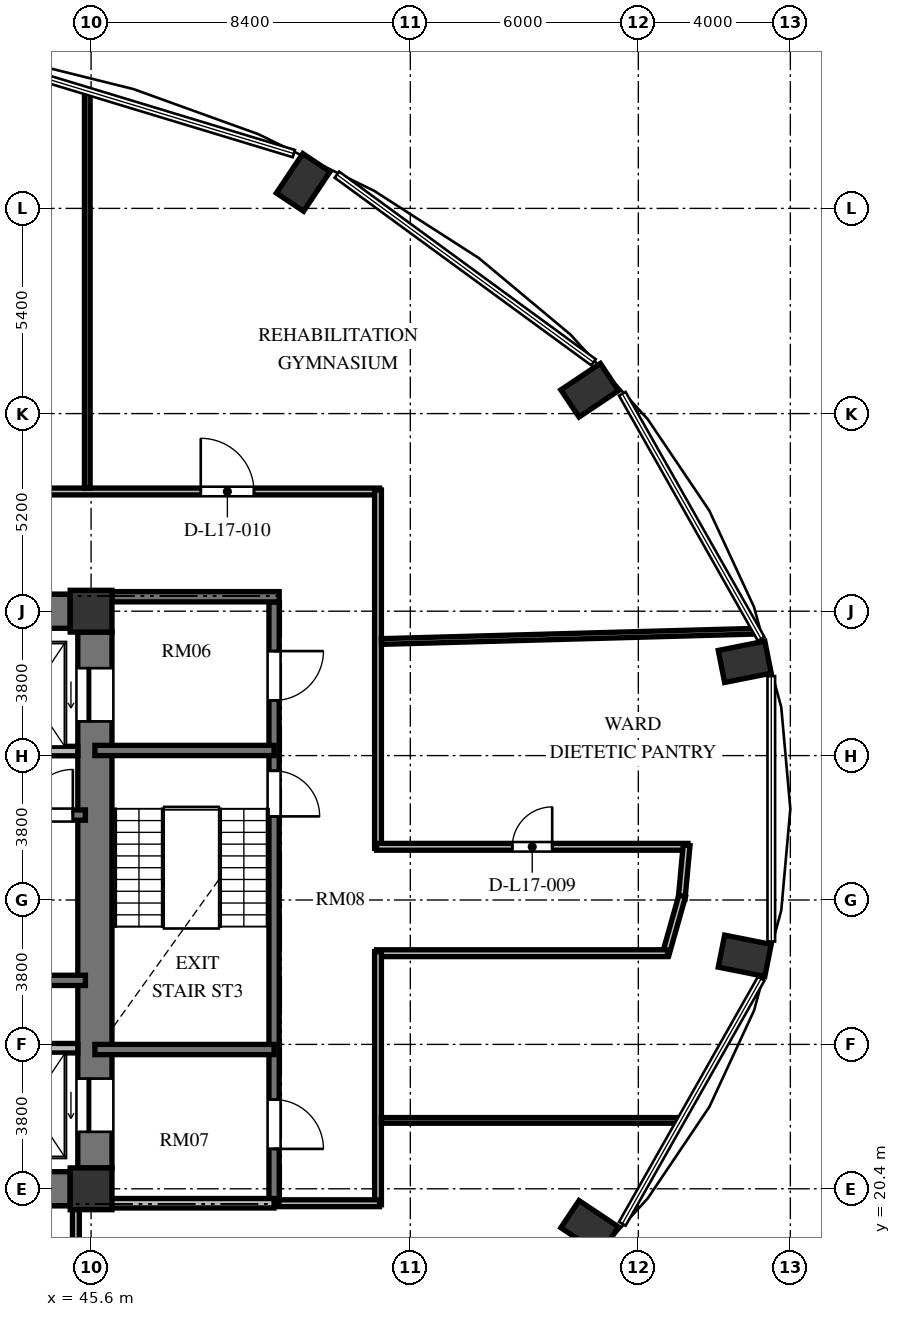
"""IFC4 building model, lengths in metres.
Left out: names, types, materials, properties, quantities, classifications, styles, units other than length and angle.
Written with IfcOpenShell. Run it as: python <this file> out.ifc"""

import sys

from ifc_helpers import new_model, si_unit, direction, frame, frame_2d, origin, origin_2d, place, context, subcontext, project, spatial, rectangle, extrude, element, fill, save


model = new_model("IFC4")
c1 = context("Model", 3, precision=1e-05, world=origin(), true_north=direction((0.0, 1.0)))
c2 = subcontext(c1, "Body", "Model", "MODEL_VIEW")
j1 = project(units=[si_unit("LENGTHUNIT", "METRE"), si_unit("PLANEANGLEUNIT", "RADIAN")], contexts=[c1])
p1 = place(None, origin())
s1 = spatial("IfcSite", under=j1, at=p1, CompositionType="ELEMENT")
p2 = place(p1, origin())
s2 = spatial("IfcBuilding", under=s1, at=p2, CompositionType="ELEMENT")
p3 = place(p2, frame((0.0, 0.0, 68.976)))
s3 = spatial("IfcBuildingStorey", under=s2, at=p3, CompositionType="ELEMENT", Elevation=68.976)
for number, where, z_axis, x_axis in (
    (1, (58.72, 19.386, 0.0), (0.0, 0.0, 1.0), (0.831, -0.556, 0.0)),
    (2, (62.8, 26.532, 0.0), (0.0, 0.0, 1.0), (0.981, -0.195, 0.0)),
    (3, (62.8, 34.268, 0.0), (0.0, 0.0, 1.0), (0.981, 0.195, 0.0)),
    (4, (58.72, 41.414, 0.0), (0.0, 0.0, 1.0), (0.831, 0.556, 0.0)),
    (5, (51.181, 46.884, 0.0), (0.0, 0.0, 1.0), (0.556, 0.831, 0.0)),
):
    element("IfcColumn", number, at=place(p3, frame(where, z_axis=z_axis, x_axis=x_axis)), inside=s3, PredefinedType="COLUMN", context=c2, shape_type="SweptSolid", body=[
        extrude(rectangle(XDim=1.25, YDim=0.86, at=origin_2d()), origin(), (0.0, 0.0, 1.0), 3.648),
    ])
for number, where, z_axis, x_axis in (
    (6, (45.6, 20.4, 0.0), (0.0, 0.0, 1.0), (1.0, 0.0, 0.0)),
    (7, (45.6, 35.6, 0.0), (0.0, 0.0, 1.0), (1.0, 0.0, 0.0)),
):
    element("IfcColumn", number, at=place(p3, frame(where, z_axis=z_axis, x_axis=x_axis)), inside=s3, PredefinedType="COLUMN", context=c2, shape_type="SweptSolid", body=[
        extrude(rectangle(XDim=1.1, YDim=1.1, at=origin_2d()), origin(), (0.0, 0.0, 1.0), 3.648),
    ])
p4 = place(p3, frame((45.7, 20.95, 0.0), z_axis=(0.0, 0.0, 1.0), x_axis=(0.0, 1.0, 0.0)))
e8 = element("IfcWall", 8, at=p4, inside=s3, PredefinedType="SHEAR", context=c2, shape_type="SweptSolid", body=[
    extrude(rectangle(XDim=14.1, YDim=0.9, at=frame_2d((7.05, 0.0))), origin(), (0.0, 0.0, 1.0), 3.648),
])
p5 = place(p4, frame((11.75, 0.0, 0.0)))
e9 = element("IfcOpeningElement", 9, at=p5, cuts=e8, PredefinedType="OPENING", context=c2, shape_type="SweptSolid", body=[
    extrude(rectangle(XDim=1.4, YDim=2.3, at=frame_2d((0.7, 1.15))), frame((0.0, 0.46, 0.0), z_axis=(0.0, -1.0, 0.0), x_axis=(1.0, 0.0, 0.0)), (0.0, 0.0, 1.0), 0.92),
])
p6 = place(p4, frame((0.95, 0.0, 0.0)))
e10 = element("IfcOpeningElement", 10, at=p6, cuts=e8, PredefinedType="OPENING", context=c2, shape_type="SweptSolid", body=[
    extrude(rectangle(XDim=1.4, YDim=2.3, at=frame_2d((0.7, 1.15))), frame((0.0, 0.46, 0.0), z_axis=(0.0, -1.0, 0.0), x_axis=(1.0, 0.0, 0.0)), (0.0, 0.0, 1.0), 0.92),
])
for number, where, z_axis, x_axis in (
    (11, (39.75, 20.4, 0.0), (0.0, 0.0, 1.0), (1.0, 0.0, 0.0)),
    (12, (39.75, 35.6, 0.0), (0.0, 0.0, 1.0), (1.0, 0.0, 0.0)),
):
    element("IfcWall", number, at=place(p3, frame(where, z_axis=z_axis, x_axis=x_axis)), inside=s3, PredefinedType="SHEAR", context=c2, shape_type="SweptSolid", body=[
        extrude(rectangle(XDim=5.3, YDim=0.9, at=frame_2d((2.65, 0.0))), origin(), (0.0, 0.0, 1.0), 3.648),
    ])
p7 = place(p3, frame((37.465, 30.235, 0.0), z_axis=(0.0, 0.0, 1.0), x_axis=(1.0, 0.0, 0.0)))
e13 = element("IfcWall", 13, at=p7, inside=s3, PredefinedType="SHEAR", context=c2, shape_type="SweptSolid", body=[
    extrude(rectangle(XDim=7.985, YDim=0.27, at=frame_2d((3.992, 0.0))), origin(), (0.0, 0.0, 1.0), 3.648),
])
p8 = place(p7, frame((6.455, 0.0, 0.0)))
e14 = element("IfcOpeningElement", 14, at=p8, cuts=e13, PredefinedType="OPENING", context=c2, shape_type="SweptSolid", body=[
    extrude(rectangle(XDim=1.2, YDim=2.15, at=frame_2d((0.6, 1.075))), frame((0.0, 0.145, 0.0), z_axis=(0.0, -1.0, 0.0), x_axis=(1.0, 0.0, 0.0)), (0.0, 0.0, 1.0), 0.29),
])
p9 = place(p3, frame((37.465, 25.885, 0.0), z_axis=(0.0, 0.0, 1.0), x_axis=(1.0, 0.0, 0.0)))
e15 = element("IfcWall", 15, at=p9, inside=s3, PredefinedType="SHEAR", context=c2, shape_type="SweptSolid", body=[
    extrude(rectangle(XDim=7.985, YDim=0.27, at=frame_2d((3.992, 0.0))), origin(), (0.0, 0.0, 1.0), 3.648),
])
for number, where, z_axis, x_axis in (
    (16, (42.95, 31.92, 0.0), (0.0, 0.0, 1.0), (1.0, 0.0, 0.0)),
    (17, (42.95, 24.1, 0.0), (0.0, 0.0, 1.0), (1.0, 0.0, 0.0)),
):
    element("IfcWall", number, at=place(p3, frame(where, z_axis=z_axis, x_axis=x_axis)), inside=s3, PredefinedType="SOLIDWALL", context=c2, shape_type="SweptSolid", body=[
        extrude(rectangle(XDim=2.3, YDim=0.25, at=frame_2d((1.15, 0.0))), origin(), (0.0, 0.0, 1.0), 3.428),
    ])
p10 = place(p3, frame((50.415, 35.845, 0.0), z_axis=(0.0, 0.0, 1.0), x_axis=(0.0, -1.0, 0.0)))
e18 = element("IfcWall", 18, at=p10, inside=s3, PredefinedType="SHEAR", context=c2, shape_type="SweptSolid", body=[
    extrude(rectangle(XDim=15.825, YDim=0.27, at=frame_2d((7.913, 0.0))), origin(), (0.0, 0.0, 1.0), 3.648),
])
p11 = place(p10, frame((4.445, 0.0, 0.0)))
e19 = element("IfcOpeningElement", 19, at=p11, cuts=e18, PredefinedType="OPENING", context=c2, shape_type="SweptSolid", body=[
    extrude(rectangle(XDim=1.2, YDim=2.15, at=frame_2d((0.6, 1.075))), frame((0.0, 0.145, 0.0), z_axis=(0.0, -1.0, 0.0), x_axis=(1.0, 0.0, 0.0)), (0.0, 0.0, 1.0), 0.29),
])
p12 = place(p10, frame((1.295, 0.0, 0.0)))
e20 = element("IfcOpeningElement", 20, at=p12, cuts=e18, PredefinedType="OPENING", context=c2, shape_type="SweptSolid", body=[
    extrude(rectangle(XDim=1.3, YDim=2.2, at=frame_2d((0.65, 1.1))), frame((0.0, 0.145, 0.0), z_axis=(0.0, -1.0, 0.0), x_axis=(1.0, 0.0, 0.0)), (0.0, 0.0, 1.0), 0.29),
])
p13 = place(p10, frame((13.095, 0.0, 0.0)))
e21 = element("IfcOpeningElement", 21, at=p13, cuts=e18, PredefinedType="OPENING", context=c2, shape_type="SweptSolid", body=[
    extrude(rectangle(XDim=1.3, YDim=2.2, at=frame_2d((0.65, 1.1))), frame((0.0, 0.145, 0.0), z_axis=(0.0, -1.0, 0.0), x_axis=(1.0, 0.0, 0.0)), (0.0, 0.0, 1.0), 0.29),
])
p14 = place(p3, frame((46.15, 35.98, 0.0), z_axis=(0.0, 0.0, 1.0), x_axis=(1.0, 0.0, 0.0)))
e22 = element("IfcWall", 22, at=p14, inside=s3, PredefinedType="SHEAR", context=c2, shape_type="SweptSolid", body=[
    extrude(rectangle(XDim=4.4, YDim=0.27, at=frame_2d((2.2, 0.0))), origin(), (0.0, 0.0, 1.0), 3.648),
])
for number, where, z_axis, x_axis in (
    (23, (45.7, 31.935, 0.0), (0.0, 0.0, 1.0), (1.0, 0.0, 0.0)),
    (24, (45.7, 24.065, 0.0), (0.0, 0.0, 1.0), (1.0, 0.0, 0.0)),
):
    element("IfcWall", number, at=place(p3, frame(where, z_axis=z_axis, x_axis=x_axis)), inside=s3, PredefinedType="SHEAR", context=c2, shape_type="SweptSolid", body=[
        extrude(rectangle(XDim=4.715, YDim=0.27, at=frame_2d((2.357, 0.0))), origin(), (0.0, 0.0, 1.0), 3.648),
    ])
p15 = place(p3, frame((45.7, 20.02, 0.0), z_axis=(0.0, 0.0, 1.0), x_axis=(1.0, 0.0, 0.0)))
e25 = element("IfcWall", 25, at=p15, inside=s3, PredefinedType="SOLIDWALL", context=c2, shape_type="SweptSolid", body=[
    extrude(rectangle(XDim=4.715, YDim=0.25, at=frame_2d((2.357, 0.0))), origin(), (0.0, 0.0, 1.0), 2.813),
])
p16 = place(p3, frame((23.31, 38.75, 0.0), z_axis=(0.0, 0.0, 1.0), x_axis=(1.0, 0.0, 0.0)))
e26 = element("IfcWall", 26, at=p16, inside=s3, PredefinedType="PARTITIONING", context=c2, shape_type="SweptSolid", body=[
    extrude(rectangle(XDim=29.88, YDim=0.18, at=frame_2d((14.94, 0.0))), origin(), (0.0, 0.0, 1.0), 3.053),
])
p17 = place(p16, frame((25.176, 0.0, 0.0)))
e27 = element("IfcOpeningElement", 27, at=p17, cuts=e26, PredefinedType="OPENING", context=c2, shape_type="SweptSolid", body=[
    extrude(rectangle(XDim=1.4, YDim=2.2, at=frame_2d((0.7, 1.1))), frame((0.0, 0.1, 0.0), z_axis=(0.0, -1.0, 0.0), x_axis=(1.0, 0.0, 0.0)), (0.0, 0.0, 1.0), 0.2),
])
p18 = place(p16, frame((17.74, 0.0, 0.0)))
e28 = element("IfcOpeningElement", 28, at=p18, cuts=e26, PredefinedType="OPENING", context=c2, shape_type="SweptSolid", body=[
    extrude(rectangle(XDim=1.4, YDim=2.2, at=frame_2d((0.7, 1.1))), frame((0.0, 0.1, 0.0), z_axis=(0.0, -1.0, 0.0), x_axis=(1.0, 0.0, 0.0)), (0.0, 0.0, 1.0), 0.2),
])
p19 = place(p16, frame((11.236, 0.0, 0.0)))
e29 = element("IfcOpeningElement", 29, at=p19, cuts=e26, PredefinedType="OPENING", context=c2, shape_type="SweptSolid", body=[
    extrude(rectangle(XDim=1.4, YDim=2.2, at=frame_2d((0.7, 1.1))), frame((0.0, 0.1, 0.0), z_axis=(0.0, -1.0, 0.0), x_axis=(1.0, 0.0, 0.0)), (0.0, 0.0, 1.0), 0.2),
])
p20 = place(p3, frame((53.15, 38.79, 0.0), z_axis=(0.0, 0.0, 1.0), x_axis=(0.0, -1.0, 0.0)))
e30 = element("IfcWall", 30, at=p20, inside=s3, PredefinedType="PARTITIONING", context=c2, shape_type="SweptSolid", body=[
    extrude(rectangle(XDim=9.43, YDim=0.18, at=frame_2d((4.715, 0.0))), origin(), (0.0, 0.0, 1.0), 3.428),
])
p21 = place(p3, frame((53.11, 29.4, 0.0), z_axis=(0.0, 0.0, 1.0), x_axis=(1.0, 0.0, 0.0)))
e31 = element("IfcWall", 31, at=p21, inside=s3, PredefinedType="PARTITIONING", context=c2, shape_type="SweptSolid", body=[
    extrude(rectangle(XDim=8.197, YDim=0.18, at=frame_2d((4.098, 0.0))), origin(), (0.0, 0.0, 1.0), 3.428),
])
p22 = place(p21, frame((3.573, 0.0, 0.0)))
e32 = element("IfcOpeningElement", 32, at=p22, cuts=e31, PredefinedType="OPENING", context=c2, shape_type="SweptSolid", body=[
    extrude(rectangle(XDim=1.05, YDim=2.15, at=frame_2d((0.525, 1.075))), frame((0.0, 0.1, 0.0), z_axis=(0.0, -1.0, 0.0), x_axis=(1.0, 0.0, 0.0)), (0.0, 0.0, 1.0), 0.2),
])
p23 = place(p3, frame((61.271, 29.44, 0.0), z_axis=(0.0, 0.0, 1.0), x_axis=(-0.092539930621, -0.995708974169, 0.0)))
e33 = element("IfcWall", 33, at=p23, inside=s3, PredefinedType="PARTITIONING", context=c2, shape_type="SweptSolid", body=[
    extrude(rectangle(XDim=1.417, YDim=0.18, at=frame_2d((0.708, 0.0))), origin(), (0.0, 0.0, 1.0), 3.428),
])
p24 = place(p3, frame((61.154, 28.107, 0.0), z_axis=(0.0, 0.0, 1.0), x_axis=(-0.271748942561, -0.962368179138, 0.0)))
e34 = element("IfcWall", 34, at=p24, inside=s3, PredefinedType="PARTITIONING", context=c2, shape_type="SweptSolid", body=[
    extrude(rectangle(XDim=1.606, YDim=0.18, at=frame_2d((0.803, 0.0))), origin(), (0.0, 0.0, 1.0), 3.428),
])
p25 = place(p3, frame((60.768, 26.6, 0.0), z_axis=(0.0, 0.0, 1.0), x_axis=(-1.0, 0.0, 0.0)))
e35 = element("IfcWall", 35, at=p25, inside=s3, PredefinedType="PARTITIONING", context=c2, shape_type="SweptSolid", body=[
    extrude(rectangle(XDim=7.658, YDim=0.18, at=frame_2d((3.829, 0.0))), origin(), (0.0, 0.0, 1.0), 3.428),
])
p26 = place(p3, frame((53.15, 26.64, 0.0), z_axis=(0.0, 0.0, 1.0), x_axis=(0.0, -1.0, 0.0)))
e36 = element("IfcWall", 36, at=p26, inside=s3, PredefinedType="PARTITIONING", context=c2, shape_type="SweptSolid", body=[
    extrude(rectangle(XDim=6.66, YDim=0.18, at=frame_2d((3.33, 0.0))), origin(), (0.0, 0.0, 1.0), 3.428),
])
p27 = place(p3, frame((53.19, 20.02, 0.0), z_axis=(0.0, 0.0, 1.0), x_axis=(-1.0, 0.0, 0.0)))
e37 = element("IfcWall", 37, at=p27, inside=s3, PredefinedType="PARTITIONING", context=c2, shape_type="SweptSolid", body=[
    extrude(rectangle(XDim=2.65, YDim=0.18, at=frame_2d((1.325, 0.0))), origin(), (0.0, 0.0, 1.0), 2.813),
])
p28 = place(p3, frame((45.2, 19.91, 0.0), z_axis=(0.0, 0.0, 1.0), x_axis=(0.0, -1.0, 0.0)))
e38 = element("IfcWall", 38, at=p28, inside=s3, PredefinedType="PARTITIONING", context=c2, shape_type="SweptSolid", body=[
    extrude(rectangle(XDim=2.55, YDim=0.18, at=frame_2d((1.275, 0.0))), origin(), (0.0, 0.0, 1.0), 3.428),
])
p29 = place(p3, frame((53.24, 22.2, 0.0), z_axis=(0.0, 0.0, 1.0), x_axis=(1.0, 0.0, 0.0)))
e39 = element("IfcWall", 39, at=p29, inside=s3, PredefinedType="PARTITIONING", context=c2, shape_type="SweptSolid", body=[
    extrude(rectangle(XDim=7.875, YDim=0.15, at=frame_2d((3.938, 0.0))), origin(), (0.0, 0.0, 1.0), 3.428),
])
p30 = place(p3, frame((53.24, 34.802, 0.0), z_axis=(0.0, 0.0, 1.0), x_axis=(0.999620561748, 0.027545099924, 0.0)))
e40 = element("IfcWall", 40, at=p30, inside=s3, PredefinedType="PARTITIONING", context=c2, shape_type="SweptSolid", body=[
    extrude(rectangle(XDim=9.891, YDim=0.15, at=frame_2d((4.946, 0.0))), origin(), (0.0, 0.0, 1.0), 2.813),
])
p31 = place(p3, frame((45.5, 38.84, 0.0), z_axis=(0.0, 0.0, 1.0), x_axis=(0.0, 1.0, 0.0)))
e41 = element("IfcWall", 41, at=p31, inside=s3, PredefinedType="PARTITIONING", context=c2, shape_type="SweptSolid", body=[
    extrude(rectangle(XDim=10.436, YDim=0.15, at=frame_2d((5.218, 0.0))), origin(), (0.0, 0.0, 1.0), 3.428),
])
p32 = place(p8, origin())
e42 = element("IfcDoor", 42, at=p32, inside=s3, OperationType="SINGLE_SWING_RIGHT", PredefinedType="DOOR", context=c2, shape_type="SweptSolid", body=[
    extrude(rectangle(XDim=1.2, YDim=2.15, at=frame_2d((0.6, 1.075))), frame((0.0, 0.025, 0.0), z_axis=(0.0, -1.0, 0.0), x_axis=(1.0, 0.0, 0.0)), (0.0, 0.0, 1.0), 0.05),
])
fill(e14, e42)
p33 = place(p5, origin())
e43 = element("IfcDoor", 43, at=p33, inside=s3, OperationType="SLIDING_TO_LEFT", PredefinedType="DOOR", context=c2, shape_type="SweptSolid", body=[
    extrude(rectangle(XDim=1.4, YDim=2.3, at=frame_2d((0.7, 1.15))), frame((0.0, 0.025, 0.0), z_axis=(0.0, -1.0, 0.0), x_axis=(1.0, 0.0, 0.0)), (0.0, 0.0, 1.0), 0.05),
])
fill(e9, e43)
p34 = place(p6, origin())
e44 = element("IfcDoor", 44, at=p34, inside=s3, OperationType="SLIDING_TO_LEFT", PredefinedType="DOOR", context=c2, shape_type="SweptSolid", body=[
    extrude(rectangle(XDim=1.4, YDim=2.3, at=frame_2d((0.7, 1.15))), frame((0.0, 0.025, 0.0), z_axis=(0.0, -1.0, 0.0), x_axis=(1.0, 0.0, 0.0)), (0.0, 0.0, 1.0), 0.05),
])
fill(e10, e44)
p35 = place(p11, origin())
e45 = element("IfcDoor", 45, at=p35, inside=s3, OperationType="SINGLE_SWING_RIGHT", PredefinedType="DOOR", context=c2, shape_type="SweptSolid", body=[
    extrude(rectangle(XDim=1.2, YDim=2.15, at=frame_2d((0.6, 1.075))), frame((0.0, 0.025, 0.0), z_axis=(0.0, -1.0, 0.0), x_axis=(1.0, 0.0, 0.0)), (0.0, 0.0, 1.0), 0.05),
])
fill(e19, e45)
p36 = place(p12, origin())
e46 = element("IfcDoor", 46, at=p36, inside=s3, OperationType="SINGLE_SWING_LEFT", PredefinedType="DOOR", context=c2, shape_type="SweptSolid", body=[
    extrude(rectangle(XDim=1.3, YDim=2.2, at=frame_2d((0.65, 1.1))), frame((0.0, 0.025, 0.0), z_axis=(0.0, -1.0, 0.0), x_axis=(1.0, 0.0, 0.0)), (0.0, 0.0, 1.0), 0.05),
])
fill(e20, e46)
p37 = place(p13, origin())
e47 = element("IfcDoor", 47, at=p37, inside=s3, OperationType="SINGLE_SWING_RIGHT", PredefinedType="DOOR", context=c2, shape_type="SweptSolid", body=[
    extrude(rectangle(XDim=1.3, YDim=2.2, at=frame_2d((0.65, 1.1))), frame((0.0, 0.025, 0.0), z_axis=(0.0, -1.0, 0.0), x_axis=(1.0, 0.0, 0.0)), (0.0, 0.0, 1.0), 0.05),
])
fill(e21, e47)
p38 = place(p22, origin())
e48 = element("IfcDoor", 48, at=p38, inside=s3, OperationType="SINGLE_SWING_RIGHT", PredefinedType="DOOR", context=c2, shape_type="SweptSolid", body=[
    extrude(rectangle(XDim=1.05, YDim=2.15, at=frame_2d((0.525, 1.075))), frame((0.0, 0.025, 0.0), z_axis=(0.0, -1.0, 0.0), x_axis=(1.0, 0.0, 0.0)), (0.0, 0.0, 1.0), 0.05),
])
fill(e32, e48)
p39 = place(p17, origin())
e49 = element("IfcDoor", 49, at=p39, inside=s3, OperationType="SINGLE_SWING_LEFT", PredefinedType="DOOR", context=c2, shape_type="SweptSolid", body=[
    extrude(rectangle(XDim=1.4, YDim=2.2, at=frame_2d((0.7, 1.1))), frame((0.0, 0.025, 0.0), z_axis=(0.0, -1.0, 0.0), x_axis=(1.0, 0.0, 0.0)), (0.0, 0.0, 1.0), 0.05),
])
fill(e27, e49)
save(model, sys.argv[1])
